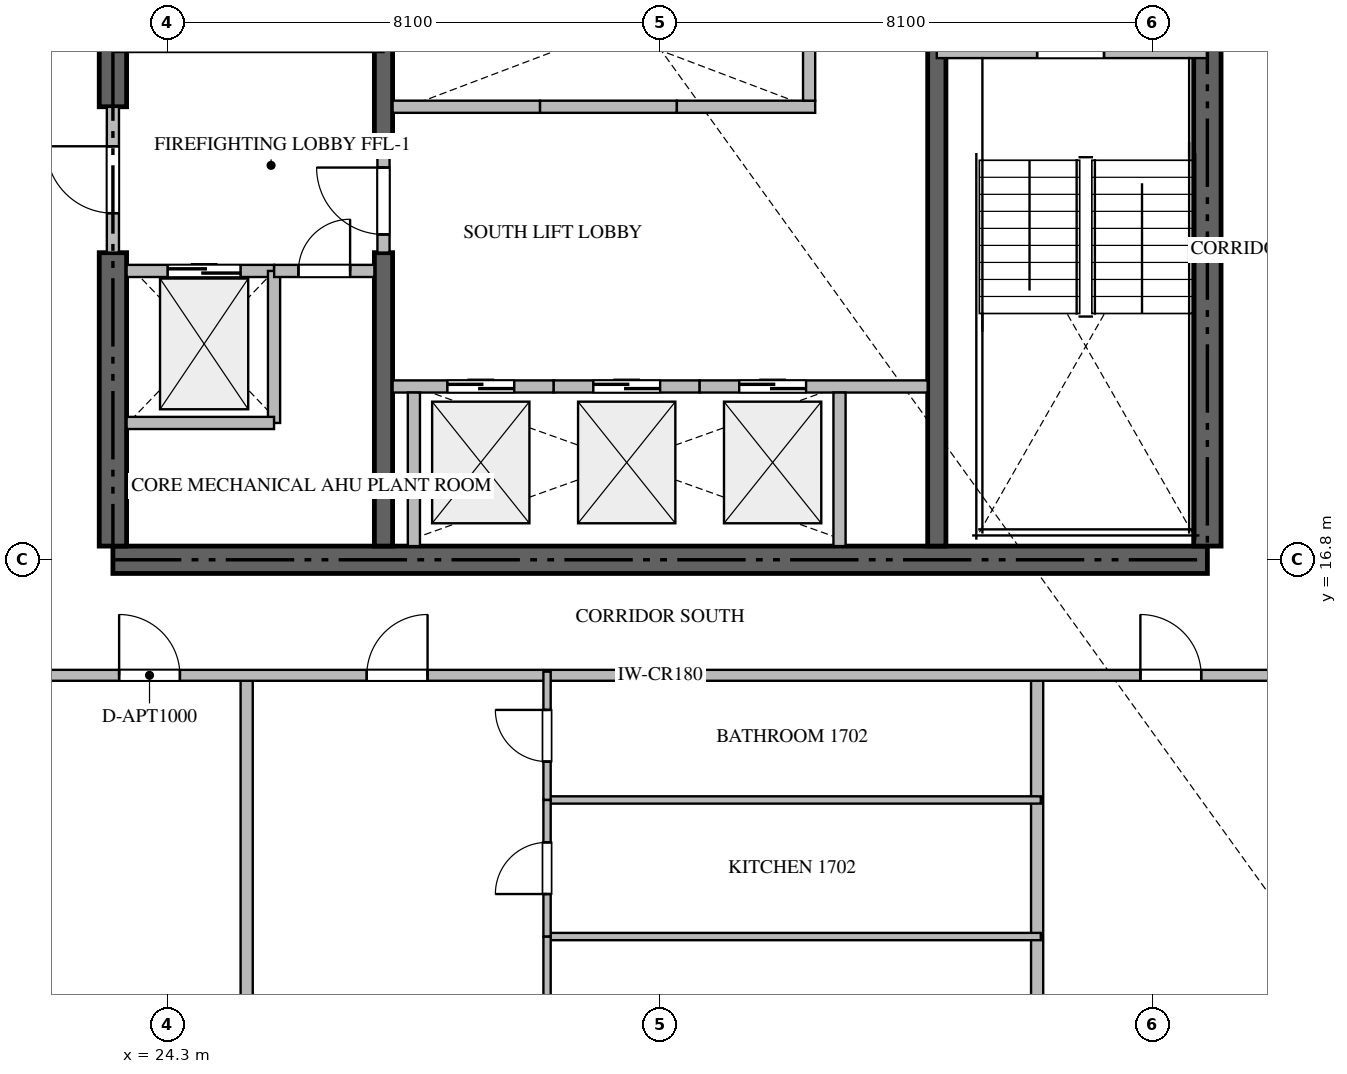
"""IFC4 building model, lengths in metres.
Left out: names, types, materials, properties, quantities, classifications, styles, units other than length and angle.
Written with IfcOpenShell. Run it as: python <this file> out.ifc"""

import sys

from ifc_helpers import new_model, si_unit, direction, frame, frame_2d, origin, place, context, subcontext, project, spatial, rectangle, extrude, source, transform, mapped, element, fill, save


model = new_model("IFC4")
c1 = context("Model", 3, precision=1e-05, world=origin(), true_north=direction((0.0, 1.0)))
c2 = subcontext(c1, "Body", "Model", "MODEL_VIEW")
j1 = project(units=[si_unit("LENGTHUNIT", "METRE"), si_unit("PLANEANGLEUNIT", "RADIAN")], contexts=[c1])
p1 = place(None, origin())
s1 = spatial("IfcSite", under=j1, at=p1, CompositionType="ELEMENT")
p2 = place(p1, origin())
s2 = spatial("IfcBuilding", under=s1, at=p2, CompositionType="ELEMENT")
p3 = place(p2, frame((0.0, 0.0, 71.7)))
s3 = spatial("IfcBuildingStorey", under=s2, at=p3, CompositionType="ELEMENT", Elevation=71.7)
p4 = place(p3, frame((23.4, 16.8, -0.26), z_axis=(0.0, 0.0, 1.0), x_axis=(1.0, 0.0, 0.0)))
e1 = element("IfcWall", 1, at=p4, inside=s3, PredefinedType="SHEAR", context=c2, shape_type="SweptSolid", body=[
    extrude(rectangle(XDim=18.0, YDim=0.45, at=frame_2d((9.0, 0.0))), origin(), (0.0, 0.0, 1.0), 3.748),
])
p5 = place(p3, frame((23.4, 17.025, -0.26), z_axis=(0.0, 0.0, 1.0), x_axis=(0.0, 1.0, 0.0)))
e2 = element("IfcWall", 2, at=p5, inside=s3, PredefinedType="SHEAR", context=c2, shape_type="SweptSolid", body=[
    extrude(rectangle(XDim=4.825, YDim=0.45, at=frame_2d((2.413, 0.0))), origin(), (0.0, 0.0, 1.0), 3.748),
])
p6 = place(p3, frame((23.4, 24.25, -0.26), z_axis=(0.0, 0.0, 1.0), x_axis=(0.0, 1.0, 0.0)))
e3 = element("IfcWall", 3, at=p6, inside=s3, PredefinedType="SHEAR", context=c2, shape_type="SweptSolid", body=[
    extrude(rectangle(XDim=9.125, YDim=0.45, at=frame_2d((4.562, 0.0))), origin(), (0.0, 0.0, 1.0), 3.748),
])
p7 = place(p3, frame((41.4, 17.025, -0.26), z_axis=(0.0, 0.0, 1.0), x_axis=(0.0, 1.0, 0.0)))
e4 = element("IfcWall", 4, at=p7, inside=s3, PredefinedType="SHEAR", context=c2, shape_type="SweptSolid", body=[
    extrude(rectangle(XDim=8.325, YDim=0.45, at=frame_2d((4.163, 0.0))), origin(), (0.0, 0.0, 1.0), 3.748),
])
p8 = place(p3, frame((27.85, 17.025, -0.26), z_axis=(0.0, 0.0, 1.0), x_axis=(0.0, 1.0, 0.0)))
e5 = element("IfcWall", 5, at=p8, inside=s3, PredefinedType="SHEAR", context=c2, shape_type="SweptSolid", body=[
    extrude(rectangle(XDim=4.825, YDim=0.3, at=frame_2d((2.413, 0.0))), origin(), (0.0, 0.0, 1.0), 3.748),
])
p9 = place(p3, frame((27.85, 23.55, -0.26), z_axis=(0.0, 0.0, 1.0), x_axis=(0.0, 1.0, 0.0)))
e6 = element("IfcWall", 6, at=p9, inside=s3, PredefinedType="SHEAR", context=c2, shape_type="SweptSolid", body=[
    extrude(rectangle(XDim=9.825, YDim=0.3, at=frame_2d((4.913, 0.0))), origin(), (0.0, 0.0, 1.0), 3.748),
])
p10 = place(p3, frame((36.95, 17.025, -0.26), z_axis=(0.0, 0.0, 1.0), x_axis=(0.0, 1.0, 0.0)))
e7 = element("IfcWall", 7, at=p10, inside=s3, PredefinedType="SHEAR", context=c2, shape_type="SweptSolid", body=[
    extrude(rectangle(XDim=8.325, YDim=0.3, at=frame_2d((4.163, 0.0))), origin(), (0.0, 0.0, 1.0), 3.748),
])
p11 = place(p3, frame((36.95, 25.15, 0.0), z_axis=(0.0, 0.0, 1.0), x_axis=(1.0, 0.0, 0.0)))
e8 = element("IfcWall", 8, at=p11, inside=s3, PredefinedType="STANDARD", context=c2, shape_type="SweptSolid", body=[
    extrude(rectangle(XDim=4.45, YDim=0.2, at=frame_2d((2.225, 0.0))), origin(), (0.0, 0.0, 1.0), 3.49),
])
p12 = place(p11, frame((1.65, 0.0, 0.0)))
e9 = element("IfcOpeningElement", 9, at=p12, cuts=e8, PredefinedType="OPENING", context=c2, shape_type="SweptSolid", body=[
    extrude(rectangle(XDim=1.1, YDim=2.15, at=frame_2d((0.55, 1.075))), frame((0.0, 0.11, 0.0), z_axis=(0.0, -1.0, 0.0), x_axis=(1.0, 0.0, 0.0)), (0.0, 0.0, 1.0), 0.22),
])
p13 = place(p3, frame((23.625, 21.55, 0.0), z_axis=(0.0, 0.0, 1.0), x_axis=(1.0, 0.0, 0.0)))
e10 = element("IfcWall", 10, at=p13, inside=s3, PredefinedType="STANDARD", context=c2, shape_type="SweptSolid", body=[
    extrude(rectangle(XDim=2.425, YDim=0.2, at=frame_2d((1.212, 0.0))), origin(), (0.0, 0.0, 1.0), 3.49),
])
p14 = place(p13, frame((0.675, 0.0, 0.0)))
e11 = element("IfcOpeningElement", 11, at=p14, cuts=e10, PredefinedType="OPENING", context=c2, shape_type="SweptSolid", body=[
    extrude(rectangle(XDim=1.2, YDim=2.2, at=frame_2d((0.6, 1.1))), frame((0.0, 0.11, 0.0), z_axis=(0.0, -1.0, 0.0), x_axis=(1.0, 0.0, 0.0)), (0.0, 0.0, 1.0), 0.22),
])
p15 = place(p3, frame((28.0, 19.65, 0.0), z_axis=(0.0, 0.0, 1.0), x_axis=(1.0, 0.0, 0.0)))
e12 = element("IfcWall", 12, at=p15, inside=s3, PredefinedType="STANDARD", context=c2, shape_type="SweptSolid", body=[
    extrude(rectangle(XDim=2.65, YDim=0.2, at=frame_2d((1.325, 0.0))), origin(), (0.0, 0.0, 1.0), 3.49),
])
p16 = place(p15, frame((0.9, 0.0, 0.0)))
e13 = element("IfcOpeningElement", 13, at=p16, cuts=e12, PredefinedType="OPENING", context=c2, shape_type="SweptSolid", body=[
    extrude(rectangle(XDim=1.1, YDim=2.2, at=frame_2d((0.55, 1.1))), frame((0.0, 0.11, 0.0), z_axis=(0.0, -1.0, 0.0), x_axis=(1.0, 0.0, 0.0)), (0.0, 0.0, 1.0), 0.22),
])
p17 = place(p3, frame((28.35, 17.025, 0.0), z_axis=(0.0, 0.0, 1.0), x_axis=(0.0, 1.0, 0.0)))
e14 = element("IfcWall", 14, at=p17, inside=s3, PredefinedType="STANDARD", context=c2, shape_type="SweptSolid", body=[
    extrude(rectangle(XDim=2.525, YDim=0.2, at=frame_2d((1.263, 0.0))), origin(), (0.0, 0.0, 1.0), 3.49),
])
p18 = place(p3, frame((30.65, 19.65, 0.0), z_axis=(0.0, 0.0, 1.0), x_axis=(1.0, 0.0, 0.0)))
e15 = element("IfcWall", 15, at=p18, inside=s3, PredefinedType="STANDARD", context=c2, shape_type="SweptSolid", body=[
    extrude(rectangle(XDim=2.4, YDim=0.2, at=frame_2d((1.2, 0.0))), origin(), (0.0, 0.0, 1.0), 3.49),
])
p19 = place(p18, frame((0.65, 0.0, 0.0)))
e16 = element("IfcOpeningElement", 16, at=p19, cuts=e15, PredefinedType="OPENING", context=c2, shape_type="SweptSolid", body=[
    extrude(rectangle(XDim=1.1, YDim=2.2, at=frame_2d((0.55, 1.1))), frame((0.0, 0.11, 0.0), z_axis=(0.0, -1.0, 0.0), x_axis=(1.0, 0.0, 0.0)), (0.0, 0.0, 1.0), 0.22),
])
p20 = place(p3, frame((33.05, 19.65, 0.0), z_axis=(0.0, 0.0, 1.0), x_axis=(1.0, 0.0, 0.0)))
e17 = element("IfcWall", 17, at=p20, inside=s3, PredefinedType="STANDARD", context=c2, shape_type="SweptSolid", body=[
    extrude(rectangle(XDim=3.75, YDim=0.2, at=frame_2d((1.875, 0.0))), origin(), (0.0, 0.0, 1.0), 3.49),
])
p21 = place(p20, frame((0.65, 0.0, 0.0)))
e18 = element("IfcOpeningElement", 18, at=p21, cuts=e17, PredefinedType="OPENING", context=c2, shape_type="SweptSolid", body=[
    extrude(rectangle(XDim=1.1, YDim=2.2, at=frame_2d((0.55, 1.1))), frame((0.0, 0.11, 0.0), z_axis=(0.0, -1.0, 0.0), x_axis=(1.0, 0.0, 0.0)), (0.0, 0.0, 1.0), 0.22),
])
p22 = place(p3, frame((35.35, 17.025, 0.0), z_axis=(0.0, 0.0, 1.0), x_axis=(0.0, 1.0, 0.0)))
e19 = element("IfcWall", 19, at=p22, inside=s3, PredefinedType="STANDARD", context=c2, shape_type="SweptSolid", body=[
    extrude(rectangle(XDim=2.525, YDim=0.2, at=frame_2d((1.263, 0.0))), origin(), (0.0, 0.0, 1.0), 3.49),
])
p23 = place(p3, frame((28.0, 24.25, 0.0), z_axis=(0.0, 0.0, 1.0), x_axis=(1.0, 0.0, 0.0)))
e20 = element("IfcWall", 20, at=p23, inside=s3, PredefinedType="STANDARD", context=c2, shape_type="SweptSolid", body=[
    extrude(rectangle(XDim=2.425, YDim=0.2, at=frame_2d((1.212, 0.0))), origin(), (0.0, 0.0, 1.0), 3.49),
])
p24 = place(p3, frame((30.425, 24.25, 0.0), z_axis=(0.0, 0.0, 1.0), x_axis=(1.0, 0.0, 0.0)))
e21 = element("IfcWall", 21, at=p24, inside=s3, PredefinedType="STANDARD", context=c2, shape_type="SweptSolid", body=[
    extrude(rectangle(XDim=2.25, YDim=0.2, at=frame_2d((1.125, 0.0))), origin(), (0.0, 0.0, 1.0), 3.49),
])
p25 = place(p3, frame((32.675, 24.25, 0.0), z_axis=(0.0, 0.0, 1.0), x_axis=(1.0, 0.0, 0.0)))
e22 = element("IfcWall", 22, at=p25, inside=s3, PredefinedType="STANDARD", context=c2, shape_type="SweptSolid", body=[
    extrude(rectangle(XDim=2.275, YDim=0.2, at=frame_2d((1.137, 0.0))), origin(), (0.0, 0.0, 1.0), 3.49),
])
for number, where, z_axis, x_axis in (
    (23, (34.85, 24.35, 0.0), (0.0, 0.0, 1.0), (0.0, 1.0, 0.0)),
    (24, (26.05, 19.05, 0.0), (0.0, 0.0, 1.0), (0.0, 1.0, 0.0)),
):
    element("IfcWall", number, at=place(p3, frame(where, z_axis=z_axis, x_axis=x_axis)), inside=s3, PredefinedType="STANDARD", context=c2, shape_type="SweptSolid", body=[
        extrude(rectangle(XDim=2.5, YDim=0.2, at=frame_2d((1.25, 0.0))), origin(), (0.0, 0.0, 1.0), 3.49),
    ])
p26 = place(p3, frame((23.625, 19.05, 0.0), z_axis=(0.0, 0.0, 1.0), x_axis=(1.0, 0.0, 0.0)))
e25 = element("IfcWall", 25, at=p26, inside=s3, PredefinedType="STANDARD", context=c2, shape_type="SweptSolid", body=[
    extrude(rectangle(XDim=2.425, YDim=0.2, at=frame_2d((1.212, 0.0))), origin(), (0.0, 0.0, 1.0), 3.49),
])
p27 = place(p3, frame((26.052, 21.55, 0.0), z_axis=(0.0, 0.0, 1.0), x_axis=(1.0, 0.0, 0.0)))
e26 = element("IfcWall", 26, at=p27, inside=s3, PredefinedType="STANDARD", context=c2, shape_type="SweptSolid", body=[
    extrude(rectangle(XDim=1.648, YDim=0.2, at=frame_2d((0.824, 0.0))), origin(), (0.0, 0.0, 1.0), 3.49),
])
p28 = place(p27, frame((0.399, 0.0, 0.0)))
e27 = element("IfcOpeningElement", 27, at=p28, cuts=e26, PredefinedType="OPENING", context=c2, shape_type="SweptSolid", body=[
    extrude(rectangle(XDim=0.85, YDim=2.1, at=frame_2d((0.425, 1.05))), frame((0.0, 0.11, 0.0), z_axis=(0.0, -1.0, 0.0), x_axis=(1.0, 0.0, 0.0)), (0.0, 0.0, 1.0), 0.22),
])
p29 = place(p3, frame((23.4, 21.852, 0.0), z_axis=(0.0, 0.0, 1.0), x_axis=(0.0, 1.0, 0.0)))
e28 = element("IfcWall", 28, at=p29, inside=s3, PredefinedType="STANDARD", context=c2, shape_type="SweptSolid", body=[
    extrude(rectangle(XDim=2.396, YDim=0.2, at=frame_2d((1.198, 0.0))), origin(), (0.0, 0.0, 1.0), 3.49),
])
p30 = place(p29, frame((0.648, 0.0, 0.0)))
e29 = element("IfcOpeningElement", 29, at=p30, cuts=e28, PredefinedType="OPENING", context=c2, shape_type="SweptSolid", body=[
    extrude(rectangle(XDim=1.1, YDim=2.15, at=frame_2d((0.55, 1.075))), frame((0.0, 0.11, 0.0), z_axis=(0.0, -1.0, 0.0), x_axis=(1.0, 0.0, 0.0)), (0.0, 0.0, 1.0), 0.22),
])
p31 = place(p3, frame((27.85, 21.852, 0.0), z_axis=(0.0, 0.0, 1.0), x_axis=(0.0, 1.0, 0.0)))
e30 = element("IfcWall", 30, at=p31, inside=s3, PredefinedType="STANDARD", context=c2, shape_type="SweptSolid", body=[
    extrude(rectangle(XDim=1.696, YDim=0.2, at=frame_2d((0.848, 0.0))), origin(), (0.0, 0.0, 1.0), 3.49),
])
p32 = place(p31, frame((0.298, 0.0, 0.0)))
e31 = element("IfcOpeningElement", 31, at=p32, cuts=e30, PredefinedType="OPENING", context=c2, shape_type="SweptSolid", body=[
    extrude(rectangle(XDim=1.1, YDim=2.15, at=frame_2d((0.55, 1.075))), frame((0.0, 0.11, 0.0), z_axis=(0.0, -1.0, 0.0), x_axis=(1.0, 0.0, 0.0)), (0.0, 0.0, 1.0), 0.22),
])
for number, where, z_axis, x_axis in (
    (32, (25.6, 0.282, 0.0), (0.0, 0.0, 1.0), (0.0, 1.0, 0.0)),
    (33, (38.6, 0.282, 0.0), (0.0, 0.0, 1.0), (0.0, 1.0, 0.0)),
):
    element("IfcWall", number, at=place(p3, frame(where, z_axis=z_axis, x_axis=x_axis)), inside=s3, PredefinedType="PARTITIONING", context=c2, shape_type="SweptSolid", body=[
        extrude(rectangle(XDim=14.618, YDim=0.2, at=frame_2d((7.309, 0.0))), origin(), (0.0, 0.0, 1.0), 3.49),
    ])
p33 = place(p3, frame((21.402, 14.9, 0.0), z_axis=(0.0, 0.0, 1.0), x_axis=(1.0, 0.0, 0.0)))
e34 = element("IfcWall", 34, at=p33, inside=s3, PredefinedType="PARTITIONING", context=c2, shape_type="SweptSolid", body=[
    extrude(rectangle(XDim=21.996, YDim=0.18, at=frame_2d((10.998, 0.0))), origin(), (0.0, 0.0, 1.0), 3.49),
])
p34 = place(p33, frame((2.1, 0.0, 0.0)))
e35 = element("IfcOpeningElement", 35, at=p34, cuts=e34, PredefinedType="OPENING", context=c2, shape_type="SweptSolid", body=[
    extrude(rectangle(XDim=1.0, YDim=2.15, at=frame_2d((0.5, 1.075))), frame((0.0, 0.1, 0.0), z_axis=(0.0, -1.0, 0.0), x_axis=(1.0, 0.0, 0.0)), (0.0, 0.0, 1.0), 0.2),
])
p35 = place(p33, frame((6.173, 0.0, 0.0)))
e36 = element("IfcOpeningElement", 36, at=p35, cuts=e34, PredefinedType="OPENING", context=c2, shape_type="SweptSolid", body=[
    extrude(rectangle(XDim=1.0, YDim=2.15, at=frame_2d((0.5, 1.075))), frame((0.0, 0.1, 0.0), z_axis=(0.0, -1.0, 0.0), x_axis=(1.0, 0.0, 0.0)), (0.0, 0.0, 1.0), 0.2),
])
p36 = place(p33, frame((18.896, 0.0, 0.0)))
e37 = element("IfcOpeningElement", 37, at=p36, cuts=e34, PredefinedType="OPENING", context=c2, shape_type="SweptSolid", body=[
    extrude(rectangle(XDim=1.0, YDim=2.15, at=frame_2d((0.5, 1.075))), frame((0.0, 0.1, 0.0), z_axis=(0.0, -1.0, 0.0), x_axis=(1.0, 0.0, 0.0)), (0.0, 0.0, 1.0), 0.2),
])
for number, where, z_axis, x_axis in (
    (38, (30.54, 10.604, 0.0), (0.0, 0.0, 1.0), (1.0, 0.0, 0.0)),
    (39, (30.54, 12.85, 0.0), (0.0, 0.0, 1.0), (1.0, 0.0, 0.0)),
):
    element("IfcWall", number, at=place(p3, frame(where, z_axis=z_axis, x_axis=x_axis)), inside=s3, PredefinedType="PARTITIONING", context=c2, shape_type="SweptSolid", body=[
        extrude(rectangle(XDim=8.12, YDim=0.12, at=frame_2d((4.06, 0.0))), origin(), (0.0, 0.0, 1.0), 3.49),
    ])
p37 = place(p3, frame((30.54, 5.563, 0.0), z_axis=(0.0, 0.0, 1.0), x_axis=(0.0, 1.0, 0.0)))
e40 = element("IfcWall", 40, at=p37, inside=s3, PredefinedType="PARTITIONING", context=c2, shape_type="SweptSolid", body=[
    extrude(rectangle(XDim=5.041, YDim=0.12, at=frame_2d((2.521, 0.0))), origin(), (0.0, 0.0, 1.0), 3.49),
])
p38 = place(p37, frame((2.095, 0.0, 0.0)))
e41 = element("IfcOpeningElement", 41, at=p38, cuts=e40, PredefinedType="OPENING", context=c2, shape_type="SweptSolid", body=[
    extrude(rectangle(XDim=0.85, YDim=2.1, at=frame_2d((0.425, 1.05))), frame((0.0, 0.07, 0.0), z_axis=(0.0, -1.0, 0.0), x_axis=(1.0, 0.0, 0.0)), (0.0, 0.0, 1.0), 0.14),
])
p39 = place(p3, frame((30.54, 10.606, 0.0), z_axis=(0.0, 0.0, 1.0), x_axis=(0.0, 1.0, 0.0)))
e42 = element("IfcWall", 42, at=p39, inside=s3, PredefinedType="PARTITIONING", context=c2, shape_type="SweptSolid", body=[
    extrude(rectangle(XDim=2.244, YDim=0.12, at=frame_2d((1.122, 0.0))), origin(), (0.0, 0.0, 1.0), 3.49),
])
p40 = place(p39, frame((0.697, 0.0, 0.0)))
e43 = element("IfcOpeningElement", 43, at=p40, cuts=e42, PredefinedType="OPENING", context=c2, shape_type="SweptSolid", body=[
    extrude(rectangle(XDim=0.85, YDim=2.1, at=frame_2d((0.425, 1.05))), frame((0.0, 0.07, 0.0), z_axis=(0.0, -1.0, 0.0), x_axis=(1.0, 0.0, 0.0)), (0.0, 0.0, 1.0), 0.14),
])
p41 = place(p3, frame((30.54, 12.852, 0.0), z_axis=(0.0, 0.0, 1.0), x_axis=(0.0, 1.0, 0.0)))
e44 = element("IfcWall", 44, at=p41, inside=s3, PredefinedType="PARTITIONING", context=c2, shape_type="SweptSolid", body=[
    extrude(rectangle(XDim=2.108, YDim=0.12, at=frame_2d((1.054, 0.0))), origin(), (0.0, 0.0, 1.0), 3.49),
])
p42 = place(p41, frame((0.629, 0.0, 0.0)))
e45 = element("IfcOpeningElement", 45, at=p42, cuts=e44, PredefinedType="OPENING", context=c2, shape_type="SweptSolid", body=[
    extrude(rectangle(XDim=0.85, YDim=2.1, at=frame_2d((0.425, 1.05))), frame((0.0, 0.07, 0.0), z_axis=(0.0, -1.0, 0.0), x_axis=(1.0, 0.0, 0.0)), (0.0, 0.0, 1.0), 0.14),
])
m1 = source(origin(), c2, "Body", "SweptSolid", [
    extrude(rectangle(XDim=1.1, YDim=2.15, at=frame_2d((0.55, 1.075))), frame((0.0, 0.025, 0.0), z_axis=(0.0, -1.0, 0.0), x_axis=(1.0, 0.0, 0.0)), (0.0, 0.0, 1.0), 0.05),
])
p43 = place(p12, origin())
e46 = element("IfcDoor", 46, at=p43, inside=s3, OperationType="SINGLE_SWING_RIGHT", PredefinedType="DOOR", context=c2, shape_type="MappedRepresentation", body=[
    mapped(m1, transform((0.0, 0.0, 0.0), scale=1.0)),
])
fill(e9, e46)
m2 = source(origin(), c2, "Body", "SweptSolid", [
    extrude(rectangle(XDim=1.2, YDim=2.2, at=frame_2d((0.6, 1.1))), frame((0.0, 0.025, 0.0), z_axis=(0.0, -1.0, 0.0), x_axis=(1.0, 0.0, 0.0)), (0.0, 0.0, 1.0), 0.05),
])
p44 = place(p14, origin())
e47 = element("IfcDoor", 47, at=p44, inside=s3, OperationType="DOUBLE_DOOR_SLIDING", PredefinedType="DOOR", context=c2, shape_type="MappedRepresentation", body=[
    mapped(m2, transform((0.0, 0.0, 0.0), scale=1.0)),
])
fill(e11, e47)
m3 = source(origin(), c2, "Body", "SweptSolid", [
    extrude(rectangle(XDim=1.1, YDim=2.2, at=frame_2d((0.55, 1.1))), frame((0.0, 0.025, 0.0), z_axis=(0.0, -1.0, 0.0), x_axis=(1.0, 0.0, 0.0)), (0.0, 0.0, 1.0), 0.05),
])
p45 = place(p16, origin())
e48 = element("IfcDoor", 48, at=p45, inside=s3, OperationType="DOUBLE_DOOR_SLIDING", PredefinedType="DOOR", context=c2, shape_type="MappedRepresentation", body=[
    mapped(m3, transform((0.0, 0.0, 0.0), scale=1.0)),
])
fill(e13, e48)
p46 = place(p19, origin())
e49 = element("IfcDoor", 49, at=p46, inside=s3, OperationType="DOUBLE_DOOR_SLIDING", PredefinedType="DOOR", context=c2, shape_type="MappedRepresentation", body=[
    mapped(m3, transform((0.0, 0.0, 0.0), scale=1.0)),
])
fill(e16, e49)
p47 = place(p21, origin())
e50 = element("IfcDoor", 50, at=p47, inside=s3, OperationType="DOUBLE_DOOR_SLIDING", PredefinedType="DOOR", context=c2, shape_type="MappedRepresentation", body=[
    mapped(m3, transform((0.0, 0.0, 0.0), scale=1.0)),
])
fill(e18, e50)
m4 = source(origin(), c2, "Body", "SweptSolid", [
    extrude(rectangle(XDim=0.85, YDim=2.1, at=frame_2d((0.425, 1.05))), frame((0.0, 0.025, 0.0), z_axis=(0.0, -1.0, 0.0), x_axis=(1.0, 0.0, 0.0)), (0.0, 0.0, 1.0), 0.05),
])
p48 = place(p28, origin())
e51 = element("IfcDoor", 51, at=p48, inside=s3, OperationType="SINGLE_SWING_RIGHT", PredefinedType="DOOR", context=c2, shape_type="MappedRepresentation", body=[
    mapped(m4, transform((0.0, 0.0, 0.0), scale=1.0)),
])
fill(e27, e51)
p49 = place(p30, origin())
e52 = element("IfcDoor", 52, at=p49, inside=s3, OperationType="SINGLE_SWING_RIGHT", PredefinedType="DOOR", context=c2, shape_type="MappedRepresentation", body=[
    mapped(m1, transform((0.0, 0.0, 0.0), scale=1.0)),
])
fill(e29, e52)
p50 = place(p32, origin())
e53 = element("IfcDoor", 53, at=p50, inside=s3, OperationType="SINGLE_SWING_RIGHT", PredefinedType="DOOR", context=c2, shape_type="MappedRepresentation", body=[
    mapped(m1, transform((0.0, 0.0, 0.0), scale=1.0)),
])
fill(e31, e53)
m5 = source(origin(), c2, "Body", "SweptSolid", [
    extrude(rectangle(XDim=1.0, YDim=2.15, at=frame_2d((0.5, 1.075))), frame((0.0, 0.025, 0.0), z_axis=(0.0, -1.0, 0.0), x_axis=(1.0, 0.0, 0.0)), (0.0, 0.0, 1.0), 0.05),
])
p51 = place(p34, origin())
e54 = element("IfcDoor", 54, at=p51, inside=s3, OperationType="SINGLE_SWING_LEFT", PredefinedType="DOOR", context=c2, shape_type="MappedRepresentation", body=[
    mapped(m5, transform((0.0, 0.0, 0.0), scale=1.0)),
])
fill(e35, e54)
p52 = place(p35, origin())
e55 = element("IfcDoor", 55, at=p52, inside=s3, OperationType="SINGLE_SWING_RIGHT", PredefinedType="DOOR", context=c2, shape_type="MappedRepresentation", body=[
    mapped(m5, transform((0.0, 0.0, 0.0), scale=1.0)),
])
fill(e36, e55)
p53 = place(p36, origin())
e56 = element("IfcDoor", 56, at=p53, inside=s3, OperationType="SINGLE_SWING_LEFT", PredefinedType="DOOR", context=c2, shape_type="MappedRepresentation", body=[
    mapped(m5, transform((0.0, 0.0, 0.0), scale=1.0)),
])
fill(e37, e56)
p54 = place(p40, origin())
e57 = element("IfcDoor", 57, at=p54, inside=s3, OperationType="SINGLE_SWING_LEFT", PredefinedType="DOOR", context=c2, shape_type="MappedRepresentation", body=[
    mapped(m4, transform((0.0, 0.0, 0.0), scale=1.0)),
])
fill(e43, e57)
p55 = place(p42, origin())
e58 = element("IfcDoor", 58, at=p55, inside=s3, OperationType="SINGLE_SWING_RIGHT", PredefinedType="DOOR", context=c2, shape_type="MappedRepresentation", body=[
    mapped(m4, transform((0.0, 0.0, 0.0), scale=1.0)),
])
fill(e45, e58)
save(model, sys.argv[1])
